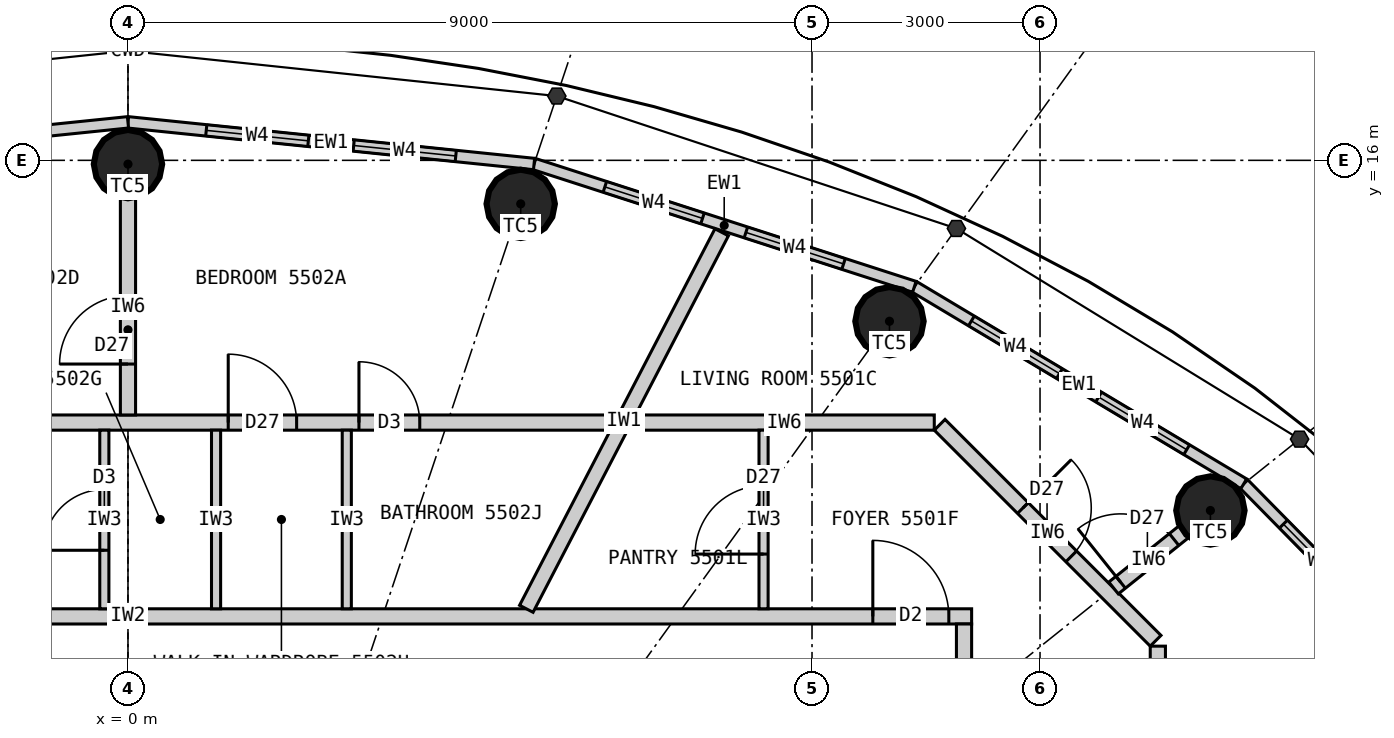
"""IFC4 building model, lengths in metres.
Left out: names, types, materials, properties, quantities, classifications, styles, units other than length and angle.
Written with IfcOpenShell. Run it as: python <this file> out.ifc"""

import sys

from ifc_helpers import new_model, si_unit, direction, frame, frame_2d, origin, origin_2d, place, context, subcontext, project, spatial, rectangle, circle, extrude, element, fill, save


model = new_model("IFC4")
c1 = context("Model", 3, precision=1e-05, world=origin(), true_north=direction((0.0, 1.0)))
c2 = subcontext(c1, "Body", "Model", "MODEL_VIEW")
j1 = project(units=[si_unit("LENGTHUNIT", "METRE"), si_unit("PLANEANGLEUNIT", "RADIAN")], contexts=[c1])
p1 = place(None, origin())
s1 = spatial("IfcSite", under=j1, at=p1, CompositionType="ELEMENT")
p2 = place(p1, origin())
s2 = spatial("IfcBuilding", under=s1, at=p2, CompositionType="ELEMENT")
p3 = place(p2, frame((0.0, 0.0, 206.1)))
s3 = spatial("IfcBuildingStorey", under=s2, at=p3, CompositionType="ELEMENT", Elevation=206.1)
for number, where, z_axis, x_axis in (
    (1, (14.241, 11.393, 0.0), (0.0, 0.0, 1.0), (1.0, 0.0, 0.0)),
    (2, (10.019, 13.883, 0.0), (0.0, 0.0, 1.0), (1.0, 0.0, 0.0)),
    (3, (5.167, 15.427, 0.0), (0.0, 0.0, 1.0), (1.0, 0.0, 0.0)),
    (4, (0.0, 15.95, 0.0), (0.0, 0.0, 1.0), (1.0, 0.0, 0.0)),
):
    element("IfcColumn", number, at=place(p3, frame(where, z_axis=z_axis, x_axis=x_axis)), inside=s3, PredefinedType="COLUMN", context=c2, shape_type="SweptSolid", body=[
        extrude(circle(Radius=0.45, at=origin_2d()), origin(), (0.0, 0.0, 1.0), 3.3),
    ])
p4 = place(p3, frame((18.04, 8.332, 0.0), z_axis=(0.0, 0.0, 1.0), x_axis=(-0.701527379618, 0.712642501993, 0.0)))
e5 = element("IfcWall", 5, at=p4, inside=s3, PredefinedType="ELEMENTEDWALL", context=c2, shape_type="SweptSolid", body=[
    extrude(rectangle(XDim=4.788, YDim=0.15, at=frame_2d((2.394, 0.0))), origin(), (0.0, 0.0, 1.0), 3.12),
])
p5 = place(p4, frame((0.744, 0.0, 0.9)))
e6 = element("IfcOpeningElement", 6, at=p5, cuts=e5, PredefinedType="OPENING", context=c2, shape_type="SweptSolid", body=[
    extrude(rectangle(XDim=1.35, YDim=1.9, at=frame_2d((0.675, 0.95))), frame((0.0, 0.085, 0.0), z_axis=(0.0, -1.0, 0.0), x_axis=(1.0, 0.0, 0.0)), (0.0, 0.0, 1.0), 0.17),
])
p6 = place(p4, frame((2.694, 0.0, 0.9)))
e7 = element("IfcOpeningElement", 7, at=p6, cuts=e5, PredefinedType="OPENING", context=c2, shape_type="SweptSolid", body=[
    extrude(rectangle(XDim=1.35, YDim=1.9, at=frame_2d((0.675, 0.95))), frame((0.0, 0.085, 0.0), z_axis=(0.0, -1.0, 0.0), x_axis=(1.0, 0.0, 0.0)), (0.0, 0.0, 1.0), 0.17),
])
p7 = place(p3, frame((14.68, 11.744, 0.0), z_axis=(0.0, 0.0, 1.0), x_axis=(-0.85822150553, 0.513279502265, 0.0)))
e8 = element("IfcWall", 8, at=p7, inside=s3, PredefinedType="ELEMENTEDWALL", context=c2, shape_type="SweptSolid", body=[
    extrude(rectangle(XDim=5.05, YDim=0.15, at=frame_2d((2.525, 0.0))), origin(), (0.0, 0.0, 1.0), 3.12),
])
p8 = place(p7, frame((0.875, 0.0, 0.9)))
e9 = element("IfcOpeningElement", 9, at=p8, cuts=e8, PredefinedType="OPENING", context=c2, shape_type="SweptSolid", body=[
    extrude(rectangle(XDim=1.35, YDim=1.9, at=frame_2d((0.675, 0.95))), frame((0.0, 0.085, 0.0), z_axis=(0.0, -1.0, 0.0), x_axis=(1.0, 0.0, 0.0)), (0.0, 0.0, 1.0), 0.17),
])
p9 = place(p7, frame((2.825, 0.0, 0.9)))
e10 = element("IfcOpeningElement", 10, at=p9, cuts=e8, PredefinedType="OPENING", context=c2, shape_type="SweptSolid", body=[
    extrude(rectangle(XDim=1.35, YDim=1.9, at=frame_2d((0.675, 0.95))), frame((0.0, 0.085, 0.0), z_axis=(0.0, -1.0, 0.0), x_axis=(1.0, 0.0, 0.0)), (0.0, 0.0, 1.0), 0.17),
])
p10 = place(p3, frame((10.346, 14.336, 0.0), z_axis=(0.0, 0.0, 1.0), x_axis=(-0.951644702515, 0.307200846638, 0.0)))
e11 = element("IfcWall", 11, at=p10, inside=s3, PredefinedType="ELEMENTEDWALL", context=c2, shape_type="SweptSolid", body=[
    extrude(rectangle(XDim=5.258, YDim=0.15, at=frame_2d((2.629, 0.0))), origin(), (0.0, 0.0, 1.0), 3.12),
])
p11 = place(p10, frame((0.979, 0.0, 0.9)))
e12 = element("IfcOpeningElement", 12, at=p11, cuts=e11, PredefinedType="OPENING", context=c2, shape_type="SweptSolid", body=[
    extrude(rectangle(XDim=1.35, YDim=1.9, at=frame_2d((0.675, 0.95))), frame((0.0, 0.085, 0.0), z_axis=(0.0, -1.0, 0.0), x_axis=(1.0, 0.0, 0.0)), (0.0, 0.0, 1.0), 0.17),
])
p12 = place(p10, frame((2.929, 0.0, 0.9)))
e13 = element("IfcOpeningElement", 13, at=p12, cuts=e11, PredefinedType="OPENING", context=c2, shape_type="SweptSolid", body=[
    extrude(rectangle(XDim=1.35, YDim=1.9, at=frame_2d((0.675, 0.95))), frame((0.0, 0.085, 0.0), z_axis=(0.0, -1.0, 0.0), x_axis=(1.0, 0.0, 0.0)), (0.0, 0.0, 1.0), 0.17),
])
p13 = place(p3, frame((5.343, 15.952, 0.0), z_axis=(0.0, 0.0, 1.0), x_axis=(-0.994774574972, 0.102095763818, 0.0)))
e14 = element("IfcWall", 14, at=p13, inside=s3, PredefinedType="ELEMENTEDWALL", context=c2, shape_type="SweptSolid", body=[
    extrude(rectangle(XDim=5.371, YDim=0.15, at=frame_2d((2.686, 0.0))), origin(), (0.0, 0.0, 1.0), 3.12),
])
p14 = place(p13, frame((1.035, 0.0, 0.9)))
e15 = element("IfcOpeningElement", 15, at=p14, cuts=e14, PredefinedType="OPENING", context=c2, shape_type="SweptSolid", body=[
    extrude(rectangle(XDim=1.35, YDim=1.9, at=frame_2d((0.675, 0.95))), frame((0.0, 0.085, 0.0), z_axis=(0.0, -1.0, 0.0), x_axis=(1.0, 0.0, 0.0)), (0.0, 0.0, 1.0), 0.17),
])
p15 = place(p13, frame((2.985, 0.0, 0.9)))
e16 = element("IfcOpeningElement", 16, at=p15, cuts=e14, PredefinedType="OPENING", context=c2, shape_type="SweptSolid", body=[
    extrude(rectangle(XDim=1.35, YDim=1.9, at=frame_2d((0.675, 0.95))), frame((0.0, 0.085, 0.0), z_axis=(0.0, -1.0, 0.0), x_axis=(1.0, 0.0, 0.0)), (0.0, 0.0, 1.0), 0.17),
])
p16 = place(p3, frame((0.0, 16.5, 0.0), z_axis=(0.0, 0.0, 1.0), x_axis=(-0.994774574972, -0.102095763818, 0.0)))
e17 = element("IfcWall", 17, at=p16, inside=s3, PredefinedType="ELEMENTEDWALL", context=c2, shape_type="SweptSolid", body=[
    extrude(rectangle(XDim=5.371, YDim=0.15, at=frame_2d((2.686, 0.0))), origin(), (0.0, 0.0, 1.0), 3.12),
])
p17 = place(p16, frame((1.035, 0.0, 0.9)))
e18 = element("IfcOpeningElement", 18, at=p17, cuts=e17, PredefinedType="OPENING", context=c2, shape_type="SweptSolid", body=[
    extrude(rectangle(XDim=1.35, YDim=1.9, at=frame_2d((0.675, 0.95))), frame((0.0, 0.085, 0.0), z_axis=(0.0, -1.0, 0.0), x_axis=(1.0, 0.0, 0.0)), (0.0, 0.0, 1.0), 0.17),
])
p18 = place(p16, frame((2.985, 0.0, 0.9)))
e19 = element("IfcOpeningElement", 19, at=p18, cuts=e17, PredefinedType="OPENING", context=c2, shape_type="SweptSolid", body=[
    extrude(rectangle(XDim=1.35, YDim=1.9, at=frame_2d((0.675, 0.95))), frame((0.0, 0.085, 0.0), z_axis=(0.0, -1.0, 0.0), x_axis=(1.0, 0.0, 0.0)), (0.0, 0.0, 1.0), 0.17),
])
p19 = place(p3, frame((-11.1, 10.0, 0.0), z_axis=(0.0, 0.0, 1.0), x_axis=(1.0, 0.0, 0.0)))
e20 = element("IfcWall", 20, at=p19, inside=s3, PredefinedType="PARTITIONING", context=c2, shape_type="SweptSolid", body=[
    extrude(rectangle(XDim=22.2, YDim=0.2, at=frame_2d((11.1, 0.0))), origin(), (0.0, 0.0, 1.0), 3.12),
])
p20 = place(p19, frame((20.9, 0.0, 0.0)))
e21 = element("IfcOpeningElement", 21, at=p20, cuts=e20, PredefinedType="OPENING", context=c2, shape_type="SweptSolid", body=[
    extrude(rectangle(XDim=1.0, YDim=2.2, at=frame_2d((0.5, 1.1))), frame((0.0, 0.11, 0.0), z_axis=(0.0, -1.0, 0.0), x_axis=(1.0, 0.0, 0.0)), (0.0, 0.0, 1.0), 0.22),
])
p21 = place(p19, frame((4.329, 0.0, 0.0)))
e22 = element("IfcOpeningElement", 22, at=p21, cuts=e20, PredefinedType="OPENING", context=c2, shape_type="SweptSolid", body=[
    extrude(rectangle(XDim=1.0, YDim=2.2, at=frame_2d((0.5, 1.1))), frame((0.0, 0.11, 0.0), z_axis=(0.0, -1.0, 0.0), x_axis=(1.0, 0.0, 0.0)), (0.0, 0.0, 1.0), 0.22),
])
p22 = place(p3, frame((11.0, -9.9, 0.0), z_axis=(0.0, 0.0, 1.0), x_axis=(0.0, 1.0, 0.0)))
e23 = element("IfcWall", 23, at=p22, inside=s3, PredefinedType="PARTITIONING", context=c2, shape_type="SweptSolid", body=[
    extrude(rectangle(XDim=19.8, YDim=0.2, at=frame_2d((9.9, 0.0))), origin(), (0.0, 0.0, 1.0), 3.12),
])
p23 = place(p3, frame((5.241, 10.1, 0.0), z_axis=(0.0, 0.0, 1.0), x_axis=(0.460603196597, 0.887606160008, 0.0)))
e24 = element("IfcWall", 24, at=p23, inside=s3, PredefinedType="PARTITIONING", context=c2, shape_type="SweptSolid", body=[
    extrude(rectangle(XDim=5.58, YDim=0.2, at=frame_2d((2.79, 0.0))), origin(), (0.0, 0.0, 1.0), 3.12),
])
p24 = place(p3, frame((13.55, 1.525, 0.0), z_axis=(0.0, 0.0, 1.0), x_axis=(0.0, 1.0, 0.0)))
e25 = element("IfcWall", 25, at=p24, inside=s3, PredefinedType="PARTITIONING", context=c2, shape_type="SweptSolid", body=[
    extrude(rectangle(XDim=8.084, YDim=0.2, at=frame_2d((4.042, 0.0))), origin(), (0.0, 0.0, 1.0), 3.12),
])
p25 = place(p24, frame((1.597, 0.0, 0.0)))
e26 = element("IfcOpeningElement", 26, at=p25, cuts=e25, PredefinedType="OPENING", context=c2, shape_type="SweptSolid", body=[
    extrude(rectangle(XDim=0.8, YDim=2.1, at=frame_2d((0.4, 1.05))), frame((0.0, 0.11, 0.0), z_axis=(0.0, -1.0, 0.0), x_axis=(1.0, 0.0, 0.0)), (0.0, 0.0, 1.0), 0.22),
])
p26 = place(p24, frame((3.57, 0.0, 0.0)))
e27 = element("IfcOpeningElement", 27, at=p26, cuts=e25, PredefinedType="OPENING", context=c2, shape_type="SweptSolid", body=[
    extrude(rectangle(XDim=0.9, YDim=2.1, at=frame_2d((0.45, 1.05))), frame((0.0, 0.11, 0.0), z_axis=(0.0, -1.0, 0.0), x_axis=(1.0, 0.0, 0.0)), (0.0, 0.0, 1.0), 0.22),
])
p27 = place(p3, frame((13.521, 9.679, 0.0), z_axis=(0.0, 0.0, 1.0), x_axis=(-0.707106781187, 0.707106781187, 0.0)))
e28 = element("IfcWall", 28, at=p27, inside=s3, PredefinedType="PARTITIONING", context=c2, shape_type="SweptSolid", body=[
    extrude(rectangle(XDim=4.019, YDim=0.2, at=frame_2d((2.009, 0.0))), origin(), (0.0, 0.0, 1.0), 3.12),
])
p28 = place(p27, frame((1.57, 0.0, 0.0)))
e29 = element("IfcOpeningElement", 29, at=p28, cuts=e28, PredefinedType="OPENING", context=c2, shape_type="SweptSolid", body=[
    extrude(rectangle(XDim=0.9, YDim=2.1, at=frame_2d((0.45, 1.05))), frame((0.0, 0.11, 0.0), z_axis=(0.0, -1.0, 0.0), x_axis=(1.0, 0.0, 0.0)), (0.0, 0.0, 1.0), 0.22),
])
p29 = place(p3, frame((10.609, 12.55, 0.0), z_axis=(0.0, 0.0, 1.0), x_axis=(-1.0, 0.0, 0.0)))
e30 = element("IfcWall", 30, at=p29, inside=s3, PredefinedType="PARTITIONING", context=c2, shape_type="SweptSolid", body=[
    extrude(rectangle(XDim=3.947, YDim=0.2, at=frame_2d((1.974, 0.0))), origin(), (0.0, 0.0, 1.0), 3.12),
])
p30 = place(p3, frame((12.968, 10.374, 0.0), z_axis=(0.0, 0.0, 1.0), x_axis=(0.780888968944, 0.624669847345, 0.0)))
e31 = element("IfcWall", 31, at=p30, inside=s3, PredefinedType="PARTITIONING", context=c2, shape_type="SweptSolid", body=[
    extrude(rectangle(XDim=1.181, YDim=0.2, at=frame_2d((0.591, 0.0))), origin(), (0.0, 0.0, 1.0), 2.42),
])
p31 = place(p30, frame((0.12, 0.0, 0.0)))
e32 = element("IfcOpeningElement", 32, at=p31, cuts=e31, PredefinedType="OPENING", context=c2, shape_type="SweptSolid", body=[
    extrude(rectangle(XDim=0.9, YDim=2.1, at=frame_2d((0.45, 1.05))), frame((0.0, 0.11, 0.0), z_axis=(0.0, -1.0, 0.0), x_axis=(1.0, 0.0, 0.0)), (0.0, 0.0, 1.0), 0.22),
])
p32 = place(p3, frame((8.363, 10.1, 0.0), z_axis=(0.0, 0.0, 1.0), x_axis=(0.0, 1.0, 0.0)))
e33 = element("IfcWall", 33, at=p32, inside=s3, PredefinedType="PARTITIONING", context=c2, shape_type="SweptSolid", body=[
    extrude(rectangle(XDim=2.35, YDim=0.12, at=frame_2d((1.175, 0.0))), origin(), (0.0, 0.0, 1.0), 3.12),
])
p33 = place(p32, frame((0.72, 0.0, 0.0)))
e34 = element("IfcOpeningElement", 34, at=p33, cuts=e33, PredefinedType="OPENING", context=c2, shape_type="SweptSolid", body=[
    extrude(rectangle(XDim=0.9, YDim=2.1, at=frame_2d((0.45, 1.05))), frame((0.0, 0.07, 0.0), z_axis=(0.0, -1.0, 0.0), x_axis=(1.0, 0.0, 0.0)), (0.0, 0.0, 1.0), 0.14),
])
p34 = place(p3, frame((6.364, 12.55, 0.0), z_axis=(0.0, 0.0, 1.0), x_axis=(-1.0, 0.0, 0.0)))
e35 = element("IfcWall", 35, at=p34, inside=s3, PredefinedType="PARTITIONING", context=c2, shape_type="SweptSolid", body=[
    extrude(rectangle(XDim=16.972, YDim=0.2, at=frame_2d((8.486, 0.0))), origin(), (0.0, 0.0, 1.0), 3.12),
])
p35 = place(p34, frame((2.525, 0.0, 0.0)))
e36 = element("IfcOpeningElement", 36, at=p35, cuts=e35, PredefinedType="OPENING", context=c2, shape_type="SweptSolid", body=[
    extrude(rectangle(XDim=0.8, YDim=2.1, at=frame_2d((0.4, 1.05))), frame((0.0, 0.11, 0.0), z_axis=(0.0, -1.0, 0.0), x_axis=(1.0, 0.0, 0.0)), (0.0, 0.0, 1.0), 0.22),
])
p36 = place(p34, frame((4.145, 0.0, 0.0)))
e37 = element("IfcOpeningElement", 37, at=p36, cuts=e35, PredefinedType="OPENING", context=c2, shape_type="SweptSolid", body=[
    extrude(rectangle(XDim=0.9, YDim=2.1, at=frame_2d((0.45, 1.05))), frame((0.0, 0.11, 0.0), z_axis=(0.0, -1.0, 0.0), x_axis=(1.0, 0.0, 0.0)), (0.0, 0.0, 1.0), 0.22),
])
p37 = place(p34, frame((13.52, 0.0, 0.0)))
e38 = element("IfcOpeningElement", 38, at=p37, cuts=e35, PredefinedType="OPENING", context=c2, shape_type="SweptSolid", body=[
    extrude(rectangle(XDim=0.9, YDim=2.1, at=frame_2d((0.45, 1.05))), frame((0.0, 0.11, 0.0), z_axis=(0.0, -1.0, 0.0), x_axis=(1.0, 0.0, 0.0)), (0.0, 0.0, 1.0), 0.22),
])
p38 = place(p3, frame((0.0, 12.65, 0.0), z_axis=(0.0, 0.0, 1.0), x_axis=(0.0, 1.0, 0.0)))
e39 = element("IfcWall", 39, at=p38, inside=s3, PredefinedType="PARTITIONING", context=c2, shape_type="SweptSolid", body=[
    extrude(rectangle(XDim=2.85, YDim=0.2, at=frame_2d((1.425, 0.0))), origin(), (0.0, 0.0, 1.0), 2.42),
])
p39 = place(p38, frame((0.67, 0.0, 0.0)))
e40 = element("IfcOpeningElement", 40, at=p39, cuts=e39, PredefinedType="OPENING", context=c2, shape_type="SweptSolid", body=[
    extrude(rectangle(XDim=0.9, YDim=2.1, at=frame_2d((0.45, 1.05))), frame((0.0, 0.11, 0.0), z_axis=(0.0, -1.0, 0.0), x_axis=(1.0, 0.0, 0.0)), (0.0, 0.0, 1.0), 0.22),
])
for number, where, z_axis, x_axis in (
    (41, (2.879, 10.1, 0.0), (0.0, 0.0, 1.0), (0.0, 1.0, 0.0)),
    (42, (1.159, 10.1, 0.0), (0.0, 0.0, 1.0), (0.0, 1.0, 0.0)),
):
    element("IfcWall", number, at=place(p3, frame(where, z_axis=z_axis, x_axis=x_axis)), inside=s3, PredefinedType="PARTITIONING", context=c2, shape_type="SweptSolid", body=[
        extrude(rectangle(XDim=2.35, YDim=0.12, at=frame_2d((1.175, 0.0))), origin(), (0.0, 0.0, 1.0), 3.12),
    ])
p40 = place(p3, frame((-0.311, 10.1, 0.0), z_axis=(0.0, 0.0, 1.0), x_axis=(0.0, 1.0, 0.0)))
e43 = element("IfcWall", 43, at=p40, inside=s3, PredefinedType="PARTITIONING", context=c2, shape_type="SweptSolid", body=[
    extrude(rectangle(XDim=2.35, YDim=0.12, at=frame_2d((1.175, 0.0))), origin(), (0.0, 0.0, 1.0), 3.12),
])
p41 = place(p40, frame((0.77, 0.0, 0.0)))
e44 = element("IfcOpeningElement", 44, at=p41, cuts=e43, PredefinedType="OPENING", context=c2, shape_type="SweptSolid", body=[
    extrude(rectangle(XDim=0.8, YDim=2.1, at=frame_2d((0.4, 1.05))), frame((0.0, 0.07, 0.0), z_axis=(0.0, -1.0, 0.0), x_axis=(1.0, 0.0, 0.0)), (0.0, 0.0, 1.0), 0.14),
])
p42 = place(p6, origin())
e45 = element("IfcWindow", 45, at=p42, inside=s3, PartitioningType="SINGLE_PANEL", PredefinedType="WINDOW", context=c2, shape_type="SweptSolid", body=[
    extrude(rectangle(XDim=1.35, YDim=1.9, at=frame_2d((0.675, 0.95))), frame((0.0, 0.03, 0.0), z_axis=(0.0, -1.0, 0.0), x_axis=(1.0, 0.0, 0.0)), (0.0, 0.0, 1.0), 0.06),
])
fill(e7, e45)
p43 = place(p8, origin())
e46 = element("IfcWindow", 46, at=p43, inside=s3, PartitioningType="SINGLE_PANEL", PredefinedType="WINDOW", context=c2, shape_type="SweptSolid", body=[
    extrude(rectangle(XDim=1.35, YDim=1.9, at=frame_2d((0.675, 0.95))), frame((0.0, 0.03, 0.0), z_axis=(0.0, -1.0, 0.0), x_axis=(1.0, 0.0, 0.0)), (0.0, 0.0, 1.0), 0.06),
])
fill(e9, e46)
p44 = place(p9, origin())
e47 = element("IfcWindow", 47, at=p44, inside=s3, PartitioningType="SINGLE_PANEL", PredefinedType="WINDOW", context=c2, shape_type="SweptSolid", body=[
    extrude(rectangle(XDim=1.35, YDim=1.9, at=frame_2d((0.675, 0.95))), frame((0.0, 0.03, 0.0), z_axis=(0.0, -1.0, 0.0), x_axis=(1.0, 0.0, 0.0)), (0.0, 0.0, 1.0), 0.06),
])
fill(e10, e47)
p45 = place(p11, origin())
e48 = element("IfcWindow", 48, at=p45, inside=s3, PartitioningType="SINGLE_PANEL", PredefinedType="WINDOW", context=c2, shape_type="SweptSolid", body=[
    extrude(rectangle(XDim=1.35, YDim=1.9, at=frame_2d((0.675, 0.95))), frame((0.0, 0.03, 0.0), z_axis=(0.0, -1.0, 0.0), x_axis=(1.0, 0.0, 0.0)), (0.0, 0.0, 1.0), 0.06),
])
fill(e12, e48)
p46 = place(p12, origin())
e49 = element("IfcWindow", 49, at=p46, inside=s3, PartitioningType="SINGLE_PANEL", PredefinedType="WINDOW", context=c2, shape_type="SweptSolid", body=[
    extrude(rectangle(XDim=1.35, YDim=1.9, at=frame_2d((0.675, 0.95))), frame((0.0, 0.03, 0.0), z_axis=(0.0, -1.0, 0.0), x_axis=(1.0, 0.0, 0.0)), (0.0, 0.0, 1.0), 0.06),
])
fill(e13, e49)
p47 = place(p14, origin())
e50 = element("IfcWindow", 50, at=p47, inside=s3, PartitioningType="SINGLE_PANEL", PredefinedType="WINDOW", context=c2, shape_type="SweptSolid", body=[
    extrude(rectangle(XDim=1.35, YDim=1.9, at=frame_2d((0.675, 0.95))), frame((0.0, 0.03, 0.0), z_axis=(0.0, -1.0, 0.0), x_axis=(1.0, 0.0, 0.0)), (0.0, 0.0, 1.0), 0.06),
])
fill(e15, e50)
p48 = place(p15, origin())
e51 = element("IfcWindow", 51, at=p48, inside=s3, PartitioningType="SINGLE_PANEL", PredefinedType="WINDOW", context=c2, shape_type="SweptSolid", body=[
    extrude(rectangle(XDim=1.35, YDim=1.9, at=frame_2d((0.675, 0.95))), frame((0.0, 0.03, 0.0), z_axis=(0.0, -1.0, 0.0), x_axis=(1.0, 0.0, 0.0)), (0.0, 0.0, 1.0), 0.06),
])
fill(e16, e51)
p49 = place(p20, origin())
e52 = element("IfcDoor", 52, at=p49, inside=s3, OperationType="SINGLE_SWING_LEFT", PredefinedType="DOOR", context=c2, shape_type="SweptSolid", body=[
    extrude(rectangle(XDim=1.0, YDim=2.2, at=frame_2d((0.5, 1.1))), frame((0.0, 0.025, 0.0), z_axis=(0.0, -1.0, 0.0), x_axis=(1.0, 0.0, 0.0)), (0.0, 0.0, 1.0), 0.05),
])
fill(e21, e52)
p50 = place(p33, origin())
e53 = element("IfcDoor", 53, at=p50, inside=s3, OperationType="SINGLE_SWING_LEFT", PredefinedType="DOOR", context=c2, shape_type="SweptSolid", body=[
    extrude(rectangle(XDim=0.9, YDim=2.1, at=frame_2d((0.45, 1.05))), frame((0.0, 0.025, 0.0), z_axis=(0.0, -1.0, 0.0), x_axis=(1.0, 0.0, 0.0)), (0.0, 0.0, 1.0), 0.05),
])
fill(e34, e53)
p51 = place(p28, origin())
e54 = element("IfcDoor", 54, at=p51, inside=s3, OperationType="SINGLE_SWING_RIGHT", PredefinedType="DOOR", context=c2, shape_type="SweptSolid", body=[
    extrude(rectangle(XDim=0.9, YDim=2.1, at=frame_2d((0.45, 1.05))), frame((0.0, 0.025, 0.0), z_axis=(0.0, -1.0, 0.0), x_axis=(1.0, 0.0, 0.0)), (0.0, 0.0, 1.0), 0.05),
])
fill(e29, e54)
p52 = place(p31, origin())
e55 = element("IfcDoor", 55, at=p52, inside=s3, OperationType="SINGLE_SWING_LEFT", PredefinedType="DOOR", context=c2, shape_type="SweptSolid", body=[
    extrude(rectangle(XDim=0.9, YDim=2.1, at=frame_2d((0.45, 1.05))), frame((0.0, 0.025, 0.0), z_axis=(0.0, -1.0, 0.0), x_axis=(1.0, 0.0, 0.0)), (0.0, 0.0, 1.0), 0.05),
])
fill(e32, e55)
p53 = place(p35, origin())
e56 = element("IfcDoor", 56, at=p53, inside=s3, OperationType="SINGLE_SWING_RIGHT", PredefinedType="DOOR", context=c2, shape_type="SweptSolid", body=[
    extrude(rectangle(XDim=0.8, YDim=2.1, at=frame_2d((0.4, 1.05))), frame((0.0, 0.025, 0.0), z_axis=(0.0, -1.0, 0.0), x_axis=(1.0, 0.0, 0.0)), (0.0, 0.0, 1.0), 0.05),
])
fill(e36, e56)
p54 = place(p36, origin())
e57 = element("IfcDoor", 57, at=p54, inside=s3, OperationType="SINGLE_SWING_RIGHT", PredefinedType="DOOR", context=c2, shape_type="SweptSolid", body=[
    extrude(rectangle(XDim=0.9, YDim=2.1, at=frame_2d((0.45, 1.05))), frame((0.0, 0.025, 0.0), z_axis=(0.0, -1.0, 0.0), x_axis=(1.0, 0.0, 0.0)), (0.0, 0.0, 1.0), 0.05),
])
fill(e37, e57)
p55 = place(p41, origin())
e58 = element("IfcDoor", 58, at=p55, inside=s3, OperationType="SINGLE_SWING_LEFT", PredefinedType="DOOR", context=c2, shape_type="SweptSolid", body=[
    extrude(rectangle(XDim=0.8, YDim=2.1, at=frame_2d((0.4, 1.05))), frame((0.0, 0.025, 0.0), z_axis=(0.0, -1.0, 0.0), x_axis=(1.0, 0.0, 0.0)), (0.0, 0.0, 1.0), 0.05),
])
fill(e44, e58)
p56 = place(p39, origin())
e59 = element("IfcDoor", 59, at=p56, inside=s3, OperationType="SINGLE_SWING_LEFT", PredefinedType="DOOR", context=c2, shape_type="SweptSolid", body=[
    extrude(rectangle(XDim=0.9, YDim=2.1, at=frame_2d((0.45, 1.05))), frame((0.0, 0.025, 0.0), z_axis=(0.0, -1.0, 0.0), x_axis=(1.0, 0.0, 0.0)), (0.0, 0.0, 1.0), 0.05),
])
fill(e40, e59)
save(model, sys.argv[1])
